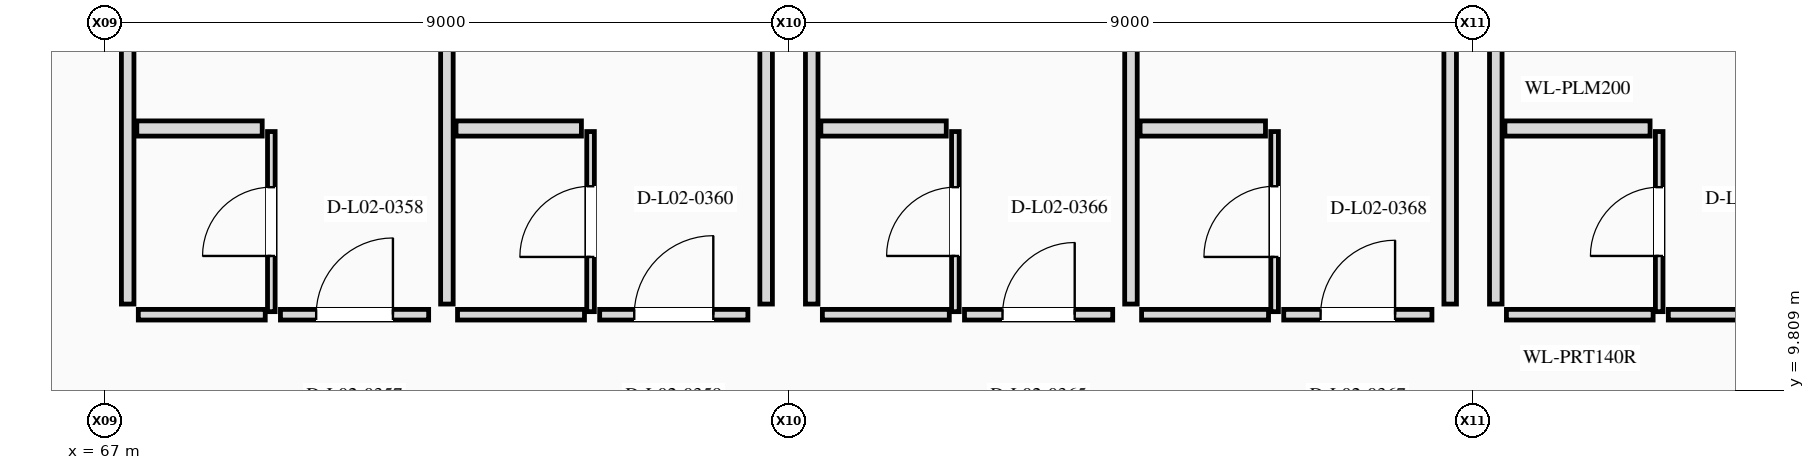
"""IFC4 building model, lengths in metres.
Left out: names, types, materials, properties, quantities, classifications, styles, units other than length and angle.
Written with IfcOpenShell. Run it as: python <this file> out.ifc"""

import sys

from ifc_helpers import new_model, si_unit, direction, frame, frame_2d, origin, place, context, subcontext, project, spatial, rectangle, extrude, element, fill, save


model = new_model("IFC4")
c1 = context("Model", 3, precision=1e-05, world=origin(), true_north=direction((0.0, 1.0)))
c2 = subcontext(c1, "Body", "Model", "MODEL_VIEW")
j1 = project(units=[si_unit("LENGTHUNIT", "METRE"), si_unit("PLANEANGLEUNIT", "RADIAN")], contexts=[c1])
p1 = place(None, origin())
s1 = spatial("IfcSite", under=j1, at=p1, CompositionType="ELEMENT")
p2 = place(p1, origin())
s2 = spatial("IfcBuilding", under=s1, at=p2, CompositionType="ELEMENT")
p3 = place(p2, frame((0.0, 0.0, 10.8)))
s3 = spatial("IfcBuildingStorey", under=s2, at=p3, CompositionType="ELEMENT", Elevation=10.8)
p4 = place(p3, frame((67.44, 10.8, 0.0), z_axis=(0.0, 0.0, 1.0), x_axis=(1.0, 0.0, 0.0)))
e1 = element("IfcWall", 1, at=p4, inside=s3, PredefinedType="PARTITIONING", context=c2, shape_type="SweptSolid", body=[
    extrude(rectangle(XDim=1.67, YDim=0.14, at=frame_2d((0.835, 0.0))), origin(), (0.0, 0.0, 1.0), 4.475),
])
p5 = place(p3, frame((69.31, 10.8, 0.0), z_axis=(0.0, 0.0, 1.0), x_axis=(1.0, 0.0, 0.0)))
e2 = element("IfcWall", 2, at=p5, inside=s3, PredefinedType="PARTITIONING", context=c2, shape_type="SweptSolid", body=[
    extrude(rectangle(XDim=1.95, YDim=0.14, at=frame_2d((0.975, 0.0))), origin(), (0.0, 0.0, 1.0), 4.475),
])
p6 = place(p5, frame((0.47, 0.0, 0.0)))
e3 = element("IfcOpeningElement", 3, at=p6, cuts=e2, PredefinedType="OPENING", context=c2, shape_type="SweptSolid", body=[
    extrude(rectangle(XDim=1.01, YDim=2.35, at=frame_2d((0.505, 1.175))), frame((0.0, 0.08, 0.0), z_axis=(0.0, -1.0, 0.0), x_axis=(1.0, 0.0, 0.0)), (0.0, 0.0, 1.0), 0.16),
])
p7 = place(p3, frame((67.3, 10.94, 0.0), z_axis=(0.0, 0.0, 1.0), x_axis=(0.0, 1.0, 0.0)))
e4 = element("IfcWall", 4, at=p7, inside=s3, PredefinedType="PARTITIONING", context=c2, shape_type="SweptSolid", body=[
    extrude(rectangle(XDim=8.012, YDim=0.165, at=frame_2d((4.006, 0.0))), origin(), (0.0, 0.0, 1.0), 3.804),
])
p8 = place(p3, frame((71.5, 10.94, 0.0), z_axis=(0.0, 0.0, 1.0), x_axis=(0.0, 1.0, 0.0)))
e5 = element("IfcWall", 5, at=p8, inside=s3, PredefinedType="PARTITIONING", context=c2, shape_type="SweptSolid", body=[
    extrude(rectangle(XDim=8.012, YDim=0.165, at=frame_2d((4.006, 0.0))), origin(), (0.0, 0.0, 1.0), 3.888),
])
p9 = place(p3, frame((69.19, 10.84, 0.0), z_axis=(0.0, 0.0, 1.0), x_axis=(0.0, 1.0, 0.0)))
e6 = element("IfcWall", 6, at=p9, inside=s3, PredefinedType="PARTITIONING", context=c2, shape_type="SweptSolid", body=[
    extrude(rectangle(XDim=2.37, YDim=0.1, at=frame_2d((1.185, 0.0))), origin(), (0.0, 0.0, 1.0), 4.083),
])
p10 = place(p9, frame((0.733, 0.0, 0.0)))
e7 = element("IfcOpeningElement", 7, at=p10, cuts=e6, PredefinedType="OPENING", context=c2, shape_type="SweptSolid", body=[
    extrude(rectangle(XDim=0.905, YDim=2.1, at=frame_2d((0.453, 1.05))), frame((0.0, 0.06, 0.0), z_axis=(0.0, -1.0, 0.0), x_axis=(1.0, 0.0, 0.0)), (0.0, 0.0, 1.0), 0.12),
])
p11 = place(p3, frame((67.42, 13.25, 0.0), z_axis=(0.0, 0.0, 1.0), x_axis=(1.0, 0.0, 0.0)))
e8 = element("IfcWall", 8, at=p11, inside=s3, PredefinedType="PLUMBINGWALL", context=c2, shape_type="SweptSolid", body=[
    extrude(rectangle(XDim=1.65, YDim=0.2, at=frame_2d((0.825, 0.0))), origin(), (0.0, 0.0, 1.0), 4.475),
])
p12 = place(p3, frame((71.64, 10.8, 0.0), z_axis=(0.0, 0.0, 1.0), x_axis=(1.0, 0.0, 0.0)))
e9 = element("IfcWall", 9, at=p12, inside=s3, PredefinedType="PARTITIONING", context=c2, shape_type="SweptSolid", body=[
    extrude(rectangle(XDim=1.67, YDim=0.14, at=frame_2d((0.835, 0.0))), origin(), (0.0, 0.0, 1.0), 4.475),
])
p13 = place(p3, frame((73.51, 10.8, 0.0), z_axis=(0.0, 0.0, 1.0), x_axis=(1.0, 0.0, 0.0)))
e10 = element("IfcWall", 10, at=p13, inside=s3, PredefinedType="PARTITIONING", context=c2, shape_type="SweptSolid", body=[
    extrude(rectangle(XDim=1.95, YDim=0.14, at=frame_2d((0.975, 0.0))), origin(), (0.0, 0.0, 1.0), 4.475),
])
p14 = place(p13, frame((0.455, 0.0, 0.0)))
e11 = element("IfcOpeningElement", 11, at=p14, cuts=e10, PredefinedType="OPENING", context=c2, shape_type="SweptSolid", body=[
    extrude(rectangle(XDim=1.04, YDim=2.4, at=frame_2d((0.52, 1.2))), frame((0.0, 0.08, 0.0), z_axis=(0.0, -1.0, 0.0), x_axis=(1.0, 0.0, 0.0)), (0.0, 0.0, 1.0), 0.16),
])
p15 = place(p3, frame((75.7, 10.94, 0.0), z_axis=(0.0, 0.0, 1.0), x_axis=(0.0, 1.0, 0.0)))
e12 = element("IfcWall", 12, at=p15, inside=s3, PredefinedType="PARTITIONING", context=c2, shape_type="SweptSolid", body=[
    extrude(rectangle(XDim=8.012, YDim=0.165, at=frame_2d((4.006, 0.0))), origin(), (0.0, 0.0, 1.0), 3.804),
])
p16 = place(p3, frame((73.39, 10.84, 0.0), z_axis=(0.0, 0.0, 1.0), x_axis=(0.0, 1.0, 0.0)))
e13 = element("IfcWall", 13, at=p16, inside=s3, PredefinedType="PARTITIONING", context=c2, shape_type="SweptSolid", body=[
    extrude(rectangle(XDim=2.37, YDim=0.1, at=frame_2d((1.185, 0.0))), origin(), (0.0, 0.0, 1.0), 4.083),
])
p17 = place(p16, frame((0.72, 0.0, 0.0)))
e14 = element("IfcOpeningElement", 14, at=p17, cuts=e13, PredefinedType="OPENING", context=c2, shape_type="SweptSolid", body=[
    extrude(rectangle(XDim=0.93, YDim=2.14, at=frame_2d((0.465, 1.07))), frame((0.0, 0.06, 0.0), z_axis=(0.0, -1.0, 0.0), x_axis=(1.0, 0.0, 0.0)), (0.0, 0.0, 1.0), 0.12),
])
p18 = place(p3, frame((71.62, 13.25, 0.0), z_axis=(0.0, 0.0, 1.0), x_axis=(1.0, 0.0, 0.0)))
e15 = element("IfcWall", 15, at=p18, inside=s3, PredefinedType="PLUMBINGWALL", context=c2, shape_type="SweptSolid", body=[
    extrude(rectangle(XDim=1.65, YDim=0.2, at=frame_2d((0.825, 0.0))), origin(), (0.0, 0.0, 1.0), 4.475),
])
p19 = place(p3, frame((76.44, 10.8, 0.0), z_axis=(0.0, 0.0, 1.0), x_axis=(1.0, 0.0, 0.0)))
e16 = element("IfcWall", 16, at=p19, inside=s3, PredefinedType="PARTITIONING", context=c2, shape_type="SweptSolid", body=[
    extrude(rectangle(XDim=1.67, YDim=0.14, at=frame_2d((0.835, 0.0))), origin(), (0.0, 0.0, 1.0), 4.475),
])
p20 = place(p3, frame((78.31, 10.8, 0.0), z_axis=(0.0, 0.0, 1.0), x_axis=(1.0, 0.0, 0.0)))
e17 = element("IfcWall", 17, at=p20, inside=s3, PredefinedType="PARTITIONING", context=c2, shape_type="SweptSolid", body=[
    extrude(rectangle(XDim=1.95, YDim=0.14, at=frame_2d((0.975, 0.0))), origin(), (0.0, 0.0, 1.0), 4.475),
])
p21 = place(p20, frame((0.5, 0.0, 0.0)))
e18 = element("IfcOpeningElement", 18, at=p21, cuts=e17, PredefinedType="OPENING", context=c2, shape_type="SweptSolid", body=[
    extrude(rectangle(XDim=0.95, YDim=2.15, at=frame_2d((0.475, 1.075))), frame((0.0, 0.08, 0.0), z_axis=(0.0, -1.0, 0.0), x_axis=(1.0, 0.0, 0.0)), (0.0, 0.0, 1.0), 0.16),
])
p22 = place(p3, frame((76.3, 10.94, 0.0), z_axis=(0.0, 0.0, 1.0), x_axis=(0.0, 1.0, 0.0)))
e19 = element("IfcWall", 19, at=p22, inside=s3, PredefinedType="PARTITIONING", context=c2, shape_type="SweptSolid", body=[
    extrude(rectangle(XDim=8.012, YDim=0.165, at=frame_2d((4.006, 0.0))), origin(), (0.0, 0.0, 1.0), 3.804),
])
p23 = place(p3, frame((80.5, 10.94, 0.0), z_axis=(0.0, 0.0, 1.0), x_axis=(0.0, 1.0, 0.0)))
e20 = element("IfcWall", 20, at=p23, inside=s3, PredefinedType="PARTITIONING", context=c2, shape_type="SweptSolid", body=[
    extrude(rectangle(XDim=8.012, YDim=0.165, at=frame_2d((4.006, 0.0))), origin(), (0.0, 0.0, 1.0), 3.888),
])
p24 = place(p3, frame((78.19, 10.84, 0.0), z_axis=(0.0, 0.0, 1.0), x_axis=(0.0, 1.0, 0.0)))
e21 = element("IfcWall", 21, at=p24, inside=s3, PredefinedType="PARTITIONING", context=c2, shape_type="SweptSolid", body=[
    extrude(rectangle(XDim=2.37, YDim=0.1, at=frame_2d((1.185, 0.0))), origin(), (0.0, 0.0, 1.0), 4.083),
])
p25 = place(p24, frame((0.733, 0.0, 0.0)))
e22 = element("IfcOpeningElement", 22, at=p25, cuts=e21, PredefinedType="OPENING", context=c2, shape_type="SweptSolid", body=[
    extrude(rectangle(XDim=0.905, YDim=2.18, at=frame_2d((0.453, 1.09))), frame((0.0, 0.06, 0.0), z_axis=(0.0, -1.0, 0.0), x_axis=(1.0, 0.0, 0.0)), (0.0, 0.0, 1.0), 0.12),
])
p26 = place(p3, frame((76.42, 13.25, 0.0), z_axis=(0.0, 0.0, 1.0), x_axis=(1.0, 0.0, 0.0)))
e23 = element("IfcWall", 23, at=p26, inside=s3, PredefinedType="PLUMBINGWALL", context=c2, shape_type="SweptSolid", body=[
    extrude(rectangle(XDim=1.65, YDim=0.2, at=frame_2d((0.825, 0.0))), origin(), (0.0, 0.0, 1.0), 4.475),
])
p27 = place(p3, frame((80.64, 10.8, 0.0), z_axis=(0.0, 0.0, 1.0), x_axis=(1.0, 0.0, 0.0)))
e24 = element("IfcWall", 24, at=p27, inside=s3, PredefinedType="PARTITIONING", context=c2, shape_type="SweptSolid", body=[
    extrude(rectangle(XDim=1.67, YDim=0.14, at=frame_2d((0.835, 0.0))), origin(), (0.0, 0.0, 1.0), 4.475),
])
p28 = place(p3, frame((82.51, 10.8, 0.0), z_axis=(0.0, 0.0, 1.0), x_axis=(1.0, 0.0, 0.0)))
e25 = element("IfcWall", 25, at=p28, inside=s3, PredefinedType="PARTITIONING", context=c2, shape_type="SweptSolid", body=[
    extrude(rectangle(XDim=1.95, YDim=0.14, at=frame_2d((0.975, 0.0))), origin(), (0.0, 0.0, 1.0), 4.475),
])
p29 = place(p28, frame((0.485, 0.0, 0.0)))
e26 = element("IfcOpeningElement", 26, at=p29, cuts=e25, PredefinedType="OPENING", context=c2, shape_type="SweptSolid", body=[
    extrude(rectangle(XDim=0.98, YDim=2.2, at=frame_2d((0.49, 1.1))), frame((0.0, 0.08, 0.0), z_axis=(0.0, -1.0, 0.0), x_axis=(1.0, 0.0, 0.0)), (0.0, 0.0, 1.0), 0.16),
])
p30 = place(p3, frame((84.7, 10.94, 0.0), z_axis=(0.0, 0.0, 1.0), x_axis=(0.0, 1.0, 0.0)))
e27 = element("IfcWall", 27, at=p30, inside=s3, PredefinedType="PARTITIONING", context=c2, shape_type="SweptSolid", body=[
    extrude(rectangle(XDim=8.012, YDim=0.165, at=frame_2d((4.006, 0.0))), origin(), (0.0, 0.0, 1.0), 3.804),
])
p31 = place(p3, frame((82.39, 10.84, 0.0), z_axis=(0.0, 0.0, 1.0), x_axis=(0.0, 1.0, 0.0)))
e28 = element("IfcWall", 28, at=p31, inside=s3, PredefinedType="PARTITIONING", context=c2, shape_type="SweptSolid", body=[
    extrude(rectangle(XDim=2.37, YDim=0.1, at=frame_2d((1.185, 0.0))), origin(), (0.0, 0.0, 1.0), 4.083),
])
p32 = place(p31, frame((0.72, 0.0, 0.0)))
e29 = element("IfcOpeningElement", 29, at=p32, cuts=e28, PredefinedType="OPENING", context=c2, shape_type="SweptSolid", body=[
    extrude(rectangle(XDim=0.93, YDim=2.22, at=frame_2d((0.465, 1.11))), frame((0.0, 0.06, 0.0), z_axis=(0.0, -1.0, 0.0), x_axis=(1.0, 0.0, 0.0)), (0.0, 0.0, 1.0), 0.12),
])
p33 = place(p3, frame((80.62, 13.25, 0.0), z_axis=(0.0, 0.0, 1.0), x_axis=(1.0, 0.0, 0.0)))
e30 = element("IfcWall", 30, at=p33, inside=s3, PredefinedType="PLUMBINGWALL", context=c2, shape_type="SweptSolid", body=[
    extrude(rectangle(XDim=1.65, YDim=0.2, at=frame_2d((0.825, 0.0))), origin(), (0.0, 0.0, 1.0), 4.475),
])
p34 = place(p3, frame((85.44, 10.8, 0.0), z_axis=(0.0, 0.0, 1.0), x_axis=(1.0, 0.0, 0.0)))
e31 = element("IfcWall", 31, at=p34, inside=s3, PredefinedType="PARTITIONING", context=c2, shape_type="SweptSolid", body=[
    extrude(rectangle(XDim=1.93, YDim=0.14, at=frame_2d((0.965, 0.0))), origin(), (0.0, 0.0, 1.0), 4.475),
])
p35 = place(p3, frame((87.57, 10.8, 0.0), z_axis=(0.0, 0.0, 1.0), x_axis=(1.0, 0.0, 0.0)))
e32 = element("IfcWall", 32, at=p35, inside=s3, PredefinedType="PARTITIONING", context=c2, shape_type="SweptSolid", body=[
    extrude(rectangle(XDim=3.19, YDim=0.14, at=frame_2d((1.595, 0.0))), origin(), (0.0, 0.0, 1.0), 4.475),
])
p36 = place(p35, frame((1.06, 0.0, 0.0)))
e33 = element("IfcOpeningElement", 33, at=p36, cuts=e32, PredefinedType="OPENING", context=c2, shape_type="SweptSolid", body=[
    extrude(rectangle(XDim=1.07, YDim=2.25, at=frame_2d((0.535, 1.125))), frame((0.0, 0.08, 0.0), z_axis=(0.0, -1.0, 0.0), x_axis=(1.0, 0.0, 0.0)), (0.0, 0.0, 1.0), 0.16),
])
p37 = place(p3, frame((85.3, 10.94, 0.0), z_axis=(0.0, 0.0, 1.0), x_axis=(0.0, 1.0, 0.0)))
e34 = element("IfcWall", 34, at=p37, inside=s3, PredefinedType="PARTITIONING", context=c2, shape_type="SweptSolid", body=[
    extrude(rectangle(XDim=8.012, YDim=0.165, at=frame_2d((4.006, 0.0))), origin(), (0.0, 0.0, 1.0), 3.804),
])
p38 = place(p3, frame((87.45, 10.84, 0.0), z_axis=(0.0, 0.0, 1.0), x_axis=(0.0, 1.0, 0.0)))
e35 = element("IfcWall", 35, at=p38, inside=s3, PredefinedType="PARTITIONING", context=c2, shape_type="SweptSolid", body=[
    extrude(rectangle(XDim=2.37, YDim=0.1, at=frame_2d((1.185, 0.0))), origin(), (0.0, 0.0, 1.0), 4.475),
])
p39 = place(p38, frame((0.733, 0.0, 0.0)))
e36 = element("IfcOpeningElement", 36, at=p39, cuts=e35, PredefinedType="OPENING", context=c2, shape_type="SweptSolid", body=[
    extrude(rectangle(XDim=0.905, YDim=2.1, at=frame_2d((0.453, 1.05))), frame((0.0, 0.06, 0.0), z_axis=(0.0, -1.0, 0.0), x_axis=(1.0, 0.0, 0.0)), (0.0, 0.0, 1.0), 0.12),
])
p40 = place(p3, frame((85.42, 13.25, 0.0), z_axis=(0.0, 0.0, 1.0), x_axis=(1.0, 0.0, 0.0)))
e37 = element("IfcWall", 37, at=p40, inside=s3, PredefinedType="PLUMBINGWALL", context=c2, shape_type="SweptSolid", body=[
    extrude(rectangle(XDim=1.91, YDim=0.2, at=frame_2d((0.955, 0.0))), origin(), (0.0, 0.0, 1.0), 4.475),
])
p41 = place(p6, origin())
e38 = element("IfcDoor", 38, at=p41, inside=s3, OperationType="SINGLE_SWING_RIGHT", PredefinedType="DOOR", context=c2, shape_type="SweptSolid", body=[
    extrude(rectangle(XDim=1.01, YDim=2.35, at=frame_2d((0.505, 1.175))), frame((0.0, 0.025, 0.0), z_axis=(0.0, -1.0, 0.0), x_axis=(1.0, 0.0, 0.0)), (0.0, 0.0, 1.0), 0.05),
])
fill(e3, e38)
p42 = place(p10, origin())
e39 = element("IfcDoor", 39, at=p42, inside=s3, OperationType="SINGLE_SWING_LEFT", PredefinedType="DOOR", context=c2, shape_type="SweptSolid", body=[
    extrude(rectangle(XDim=0.905, YDim=2.1, at=frame_2d((0.453, 1.05))), frame((0.0, 0.025, 0.0), z_axis=(0.0, -1.0, 0.0), x_axis=(1.0, 0.0, 0.0)), (0.0, 0.0, 1.0), 0.05),
])
fill(e7, e39)
p43 = place(p14, origin())
e40 = element("IfcDoor", 40, at=p43, inside=s3, OperationType="SINGLE_SWING_RIGHT", PredefinedType="DOOR", context=c2, shape_type="SweptSolid", body=[
    extrude(rectangle(XDim=1.04, YDim=2.4, at=frame_2d((0.52, 1.2))), frame((0.0, 0.025, 0.0), z_axis=(0.0, -1.0, 0.0), x_axis=(1.0, 0.0, 0.0)), (0.0, 0.0, 1.0), 0.05),
])
fill(e11, e40)
p44 = place(p17, origin())
e41 = element("IfcDoor", 41, at=p44, inside=s3, OperationType="SINGLE_SWING_LEFT", PredefinedType="DOOR", context=c2, shape_type="SweptSolid", body=[
    extrude(rectangle(XDim=0.93, YDim=2.14, at=frame_2d((0.465, 1.07))), frame((0.0, 0.025, 0.0), z_axis=(0.0, -1.0, 0.0), x_axis=(1.0, 0.0, 0.0)), (0.0, 0.0, 1.0), 0.05),
])
fill(e14, e41)
p45 = place(p21, origin())
e42 = element("IfcDoor", 42, at=p45, inside=s3, OperationType="SINGLE_SWING_RIGHT", PredefinedType="DOOR", context=c2, shape_type="SweptSolid", body=[
    extrude(rectangle(XDim=0.95, YDim=2.15, at=frame_2d((0.475, 1.075))), frame((0.0, 0.025, 0.0), z_axis=(0.0, -1.0, 0.0), x_axis=(1.0, 0.0, 0.0)), (0.0, 0.0, 1.0), 0.05),
])
fill(e18, e42)
p46 = place(p25, origin())
e43 = element("IfcDoor", 43, at=p46, inside=s3, OperationType="SINGLE_SWING_LEFT", PredefinedType="DOOR", context=c2, shape_type="SweptSolid", body=[
    extrude(rectangle(XDim=0.905, YDim=2.18, at=frame_2d((0.453, 1.09))), frame((0.0, 0.025, 0.0), z_axis=(0.0, -1.0, 0.0), x_axis=(1.0, 0.0, 0.0)), (0.0, 0.0, 1.0), 0.05),
])
fill(e22, e43)
p47 = place(p29, origin())
e44 = element("IfcDoor", 44, at=p47, inside=s3, OperationType="SINGLE_SWING_RIGHT", PredefinedType="DOOR", context=c2, shape_type="SweptSolid", body=[
    extrude(rectangle(XDim=0.98, YDim=2.2, at=frame_2d((0.49, 1.1))), frame((0.0, 0.025, 0.0), z_axis=(0.0, -1.0, 0.0), x_axis=(1.0, 0.0, 0.0)), (0.0, 0.0, 1.0), 0.05),
])
fill(e26, e44)
p48 = place(p32, origin())
e45 = element("IfcDoor", 45, at=p48, inside=s3, OperationType="SINGLE_SWING_LEFT", PredefinedType="DOOR", context=c2, shape_type="SweptSolid", body=[
    extrude(rectangle(XDim=0.93, YDim=2.22, at=frame_2d((0.465, 1.11))), frame((0.0, 0.025, 0.0), z_axis=(0.0, -1.0, 0.0), x_axis=(1.0, 0.0, 0.0)), (0.0, 0.0, 1.0), 0.05),
])
fill(e29, e45)
p49 = place(p39, origin())
e46 = element("IfcDoor", 46, at=p49, inside=s3, OperationType="SINGLE_SWING_LEFT", PredefinedType="DOOR", context=c2, shape_type="SweptSolid", body=[
    extrude(rectangle(XDim=0.905, YDim=2.1, at=frame_2d((0.453, 1.05))), frame((0.0, 0.025, 0.0), z_axis=(0.0, -1.0, 0.0), x_axis=(1.0, 0.0, 0.0)), (0.0, 0.0, 1.0), 0.05),
])
fill(e36, e46)
save(model, sys.argv[1])
